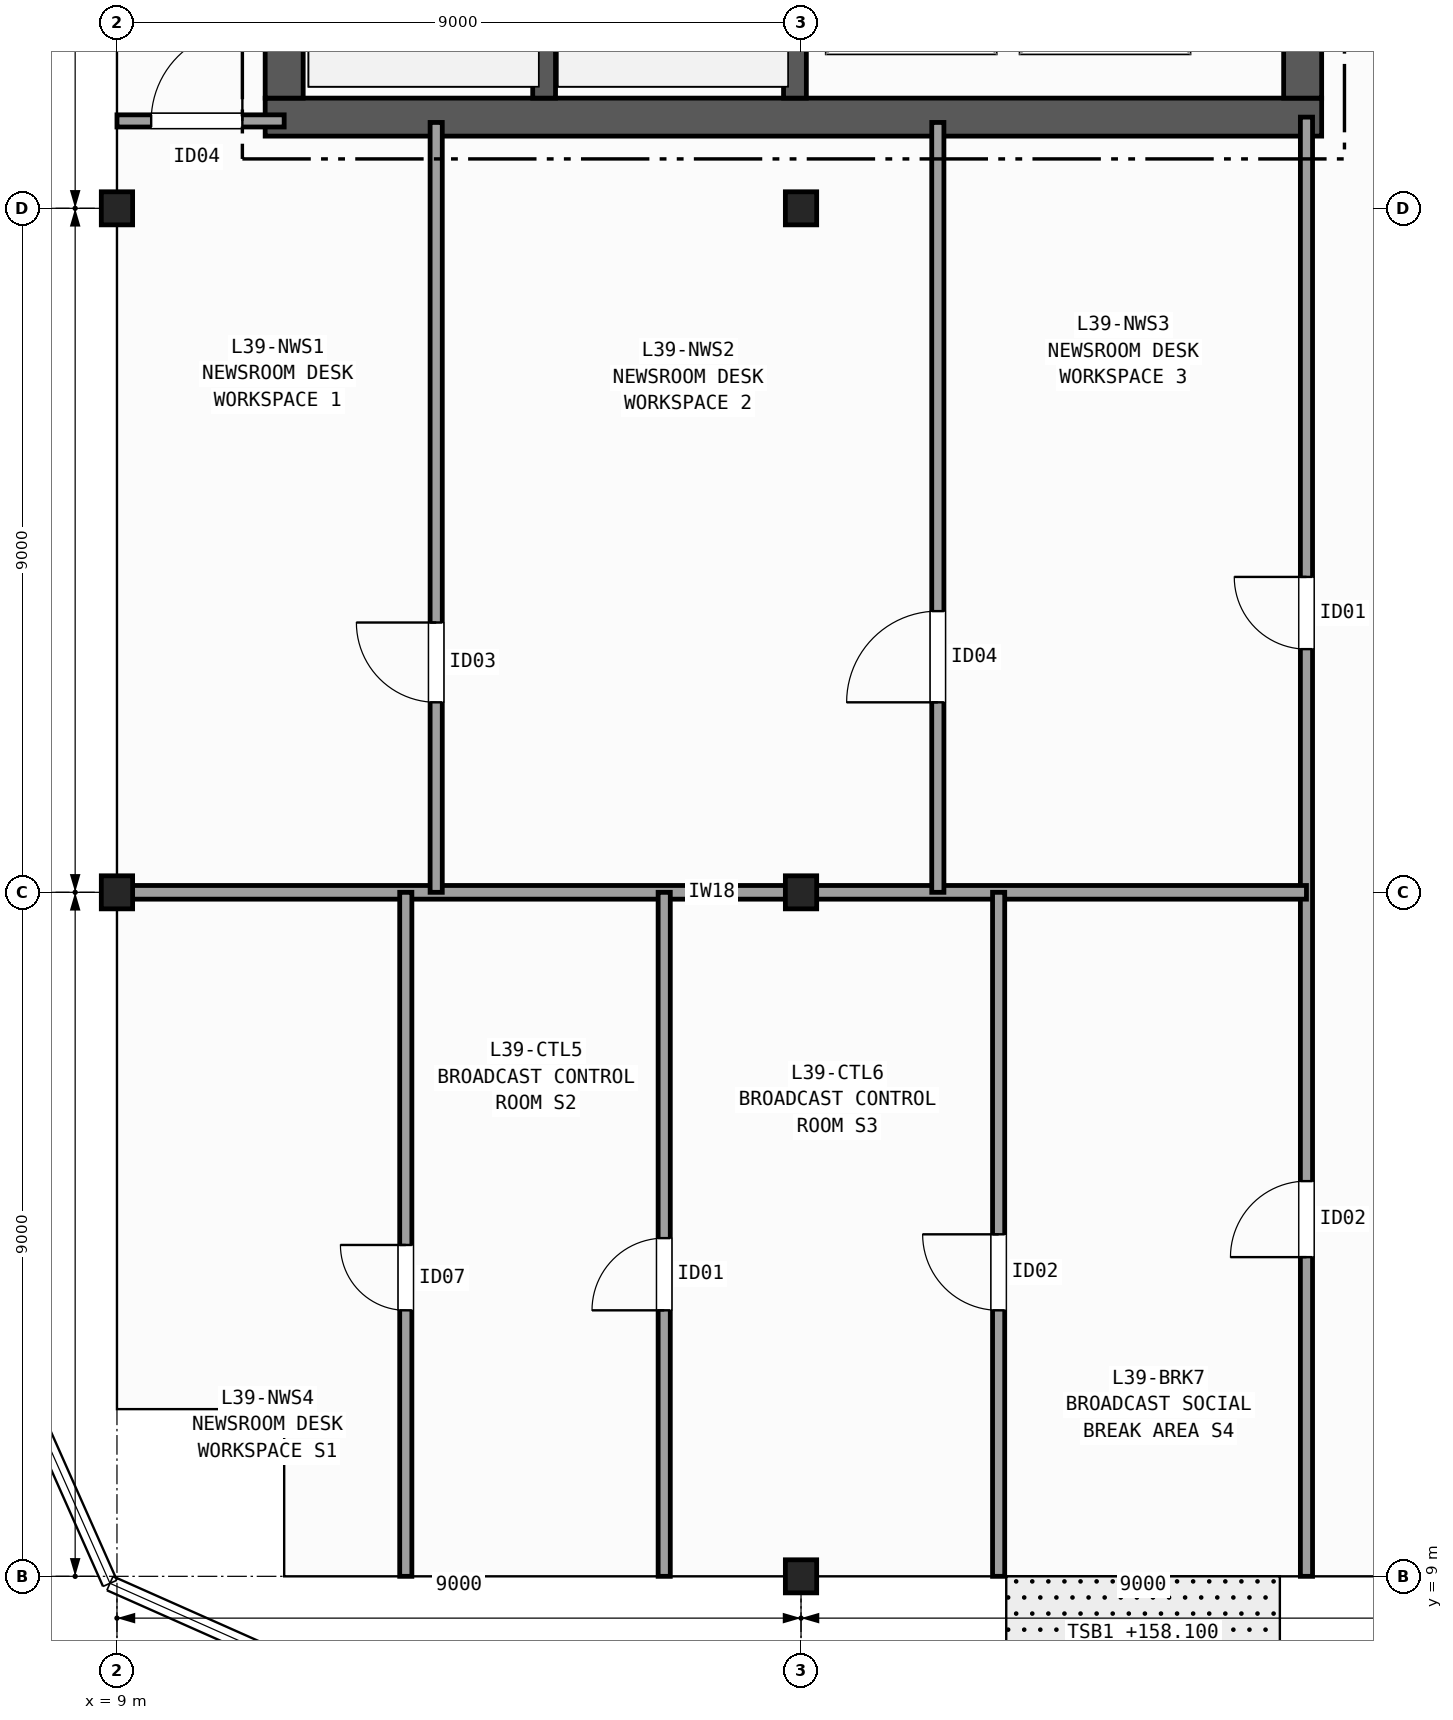
"""IFC4 building model, lengths in metres.
Left out: names, types, materials, properties, quantities, classifications, styles, units other than length and angle.
Written with IfcOpenShell. Run it as: python <this file> out.ifc"""

import sys

from ifc_helpers import new_model, si_unit, direction, frame, frame_2d, origin, origin_2d, place, context, subcontext, project, spatial, rectangle, i_section, extrude, element, fill, save


model = new_model("IFC4")
c1 = context("Model", 3, precision=1e-05, world=origin(), true_north=direction((0.0, 1.0)))
c2 = subcontext(c1, "Body", "Model", "MODEL_VIEW")
j1 = project(units=[si_unit("LENGTHUNIT", "METRE"), si_unit("PLANEANGLEUNIT", "RADIAN")], contexts=[c1])
p1 = place(None, origin())
s1 = spatial("IfcSite", under=j1, at=p1, CompositionType="ELEMENT")
p2 = place(p1, origin())
s2 = spatial("IfcBuilding", under=s1, at=p2, CompositionType="ELEMENT")
p3 = place(p2, frame((0.0, 0.0, 158.1)))
s3 = spatial("IfcBuildingStorey", under=s2, at=p3, CompositionType="ELEMENT", Elevation=158.1)
for number, where, z_axis, x_axis in (
    (1, (9.0, 18.0, 0.0), (0.0, 0.0, 1.0), (1.0, 0.0, 0.0)),
    (2, (9.0, 27.0, 0.0), (0.0, 0.0, 1.0), (1.0, 0.0, 0.0)),
    (3, (18.0, 9.0, 0.0), (0.0, 0.0, 1.0), (1.0, 0.0, 0.0)),
    (4, (18.0, 18.0, 0.0), (0.0, 0.0, 1.0), (1.0, 0.0, 0.0)),
    (5, (18.0, 27.0, 0.0), (0.0, 0.0, 1.0), (1.0, 0.0, 0.0)),
):
    element("IfcColumn", number, at=place(p3, frame(where, z_axis=z_axis, x_axis=x_axis)), inside=s3, PredefinedType="COLUMN", context=c2, shape_type="SweptSolid", body=[
        extrude(i_section(OverallWidth=0.412, OverallDepth=0.435, WebThickness=0.036, FlangeThickness=0.057, FilletRadius=0.015, at=origin_2d()), origin(), (0.0, 0.0, 1.0), 3.7),
    ])
p4 = place(p3, frame((10.95, 28.2, 0.0), z_axis=(0.0, 0.0, 1.0), x_axis=(1.0, 0.0, 0.0)))
e6 = element("IfcWall", 6, at=p4, inside=s3, PredefinedType="SHEAR", context=c2, shape_type="SweptSolid", body=[
    extrude(rectangle(XDim=13.9, YDim=0.5, at=frame_2d((6.95, 0.0))), origin(), (0.0, 0.0, 1.0), 3.42),
])
p5 = place(p3, frame((11.2, 42.15, 0.0), z_axis=(0.0, 0.0, 1.0), x_axis=(0.0, -1.0, 0.0)))
e7 = element("IfcWall", 7, at=p5, inside=s3, PredefinedType="SHEAR", context=c2, shape_type="SweptSolid", body=[
    extrude(rectangle(XDim=13.7, YDim=0.5, at=frame_2d((6.85, 0.0))), origin(), (0.0, 0.0, 1.0), 3.42),
])
p6 = place(p3, frame((24.6, 28.45, 0.0), z_axis=(0.0, 0.0, 1.0), x_axis=(0.0, 1.0, 0.0)))
e8 = element("IfcWall", 8, at=p6, inside=s3, PredefinedType="SHEAR", context=c2, shape_type="SweptSolid", body=[
    extrude(rectangle(XDim=13.7, YDim=0.5, at=frame_2d((6.85, 0.0))), origin(), (0.0, 0.0, 1.0), 3.42),
])
p7 = place(p6, frame((3.35, 0.0, 0.0)))
e9 = element("IfcOpeningElement", 9, at=p7, cuts=e8, PredefinedType="OPENING", context=c2, shape_type="SweptSolid", body=[
    extrude(rectangle(XDim=1.5, YDim=2.2, at=frame_2d((0.75, 1.1))), frame((0.0, 0.26, 0.0), z_axis=(0.0, -1.0, 0.0), x_axis=(1.0, 0.0, 0.0)), (0.0, 0.0, 1.0), 0.52),
])
p8 = place(p6, frame((9.95, 0.0, 0.0)))
e10 = element("IfcOpeningElement", 10, at=p8, cuts=e8, PredefinedType="OPENING", context=c2, shape_type="SweptSolid", body=[
    extrude(rectangle(XDim=0.9, YDim=2.1, at=frame_2d((0.45, 1.05))), frame((0.0, 0.26, 0.0), z_axis=(0.0, -1.0, 0.0), x_axis=(1.0, 0.0, 0.0)), (0.0, 0.0, 1.0), 0.52),
])
p9 = place(p6, frame((12.05, 0.0, 0.0)))
e11 = element("IfcOpeningElement", 11, at=p9, cuts=e8, PredefinedType="OPENING", context=c2, shape_type="SweptSolid", body=[
    extrude(rectangle(XDim=0.9, YDim=2.1, at=frame_2d((0.45, 1.05))), frame((0.0, 0.26, 0.0), z_axis=(0.0, -1.0, 0.0), x_axis=(1.0, 0.0, 0.0)), (0.0, 0.0, 1.0), 0.52),
])
p10 = place(p3, frame((14.62, 28.45, 0.0), z_axis=(0.0, 0.0, 1.0), x_axis=(0.0, 1.0, 0.0)))
e12 = element("IfcWall", 12, at=p10, inside=s3, PredefinedType="SHEAR", context=c2, shape_type="SweptSolid", body=[
    extrude(rectangle(XDim=9.0, YDim=0.3, at=frame_2d((4.5, 0.0))), origin(), (0.0, 0.0, 1.0), 3.42),
])
p11 = place(p3, frame((17.92, 42.15, 0.0), z_axis=(0.0, 0.0, 1.0), x_axis=(0.0, -1.0, 0.0)))
e13 = element("IfcWall", 13, at=p11, inside=s3, PredefinedType="SHEAR", context=c2, shape_type="SweptSolid", body=[
    extrude(rectangle(XDim=13.7, YDim=0.3, at=frame_2d((6.85, 0.0))), origin(), (0.0, 0.0, 1.0), 3.42),
])
p12 = place(p11, frame((1.975, 0.0, 0.0)))
e14 = element("IfcOpeningElement", 14, at=p12, cuts=e13, PredefinedType="OPENING", context=c2, shape_type="SweptSolid", body=[
    extrude(rectangle(XDim=1.15, YDim=2.15, at=frame_2d((0.575, 1.075))), frame((0.0, 0.16, 0.0), z_axis=(0.0, -1.0, 0.0), x_axis=(1.0, 0.0, 0.0)), (0.0, 0.0, 1.0), 0.32),
])
p13 = place(p3, frame((9.0, 28.15, 0.0), z_axis=(0.0, 0.0, 1.0), x_axis=(1.0, 0.0, 0.0)))
e15 = element("IfcWall", 15, at=p13, inside=s3, PredefinedType="PARTITIONING", context=c2, shape_type="SweptSolid", body=[
    extrude(rectangle(XDim=2.2, YDim=0.16, at=frame_2d((1.1, 0.0))), origin(), (0.0, 0.0, 1.0), 2.634),
])
p14 = place(p13, frame((0.45, 0.0, 0.0)))
e16 = element("IfcOpeningElement", 16, at=p14, cuts=e15, PredefinedType="OPENING", context=c2, shape_type="SweptSolid", body=[
    extrude(rectangle(XDim=1.2, YDim=2.15, at=frame_2d((0.6, 1.075))), frame((0.0, 0.09, 0.0), z_axis=(0.0, -1.0, 0.0), x_axis=(1.0, 0.0, 0.0)), (0.0, 0.0, 1.0), 0.18),
])
p15 = place(p3, frame((24.65, 9.0, 0.0), z_axis=(0.0, 0.0, 1.0), x_axis=(0.0, 1.0, 0.0)))
e17 = element("IfcWall", 17, at=p15, inside=s3, PredefinedType="PARTITIONING", context=c2, shape_type="SweptSolid", body=[
    extrude(rectangle(XDim=19.2, YDim=0.16, at=frame_2d((9.6, 0.0))), origin(), (0.0, 0.0, 1.0), 2.634),
])
p16 = place(p15, frame((12.2, 0.0, 0.0)))
e18 = element("IfcOpeningElement", 18, at=p16, cuts=e17, PredefinedType="OPENING", context=c2, shape_type="SweptSolid", body=[
    extrude(rectangle(XDim=0.95, YDim=2.1, at=frame_2d((0.475, 1.05))), frame((0.0, 0.09, 0.0), z_axis=(0.0, -1.0, 0.0), x_axis=(1.0, 0.0, 0.0)), (0.0, 0.0, 1.0), 0.18),
])
p17 = place(p15, frame((4.2, 0.0, 0.0)))
e19 = element("IfcOpeningElement", 19, at=p17, cuts=e17, PredefinedType="OPENING", context=c2, shape_type="SweptSolid", body=[
    extrude(rectangle(XDim=1.0, YDim=2.1, at=frame_2d((0.5, 1.05))), frame((0.0, 0.09, 0.0), z_axis=(0.0, -1.0, 0.0), x_axis=(1.0, 0.0, 0.0)), (0.0, 0.0, 1.0), 0.18),
])
p18 = place(p3, frame((9.0, 18.0, 0.0), z_axis=(0.0, 0.0, 1.0), x_axis=(1.0, 0.0, 0.0)))
e20 = element("IfcWall", 20, at=p18, inside=s3, PredefinedType="PARTITIONING", context=c2, shape_type="SweptSolid", body=[
    extrude(rectangle(XDim=15.65, YDim=0.18, at=frame_2d((7.825, 0.0))), origin(), (0.0, 0.0, 1.0), 2.634),
])
p19 = place(p3, frame((13.2, 18.0, 0.0), z_axis=(0.0, 0.0, 1.0), x_axis=(0.0, 1.0, 0.0)))
e21 = element("IfcWall", 21, at=p19, inside=s3, PredefinedType="PARTITIONING", context=c2, shape_type="SweptSolid", body=[
    extrude(rectangle(XDim=10.13, YDim=0.16, at=frame_2d((5.065, 0.0))), origin(), (0.0, 0.0, 1.0), 2.789),
])
p20 = place(p19, frame((2.5, 0.0, 0.0)))
e22 = element("IfcOpeningElement", 22, at=p20, cuts=e21, PredefinedType="OPENING", context=c2, shape_type="SweptSolid", body=[
    extrude(rectangle(XDim=1.05, YDim=2.15, at=frame_2d((0.525, 1.075))), frame((0.0, 0.09, 0.0), z_axis=(0.0, -1.0, 0.0), x_axis=(1.0, 0.0, 0.0)), (0.0, 0.0, 1.0), 0.18),
])
p21 = place(p3, frame((19.8, 18.0, 0.0), z_axis=(0.0, 0.0, 1.0), x_axis=(0.0, 1.0, 0.0)))
e23 = element("IfcWall", 23, at=p21, inside=s3, PredefinedType="PARTITIONING", context=c2, shape_type="SweptSolid", body=[
    extrude(rectangle(XDim=10.13, YDim=0.16, at=frame_2d((5.065, 0.0))), origin(), (0.0, 0.0, 1.0), 2.789),
])
p22 = place(p21, frame((2.5, 0.0, 0.0)))
e24 = element("IfcOpeningElement", 24, at=p22, cuts=e23, PredefinedType="OPENING", context=c2, shape_type="SweptSolid", body=[
    extrude(rectangle(XDim=1.2, YDim=2.15, at=frame_2d((0.6, 1.075))), frame((0.0, 0.09, 0.0), z_axis=(0.0, -1.0, 0.0), x_axis=(1.0, 0.0, 0.0)), (0.0, 0.0, 1.0), 0.18),
])
p23 = place(p3, frame((12.8, 9.0, 0.0), z_axis=(0.0, 0.0, 1.0), x_axis=(0.0, 1.0, 0.0)))
e25 = element("IfcWall", 25, at=p23, inside=s3, PredefinedType="PARTITIONING", context=c2, shape_type="SweptSolid", body=[
    extrude(rectangle(XDim=9.0, YDim=0.16, at=frame_2d((4.5, 0.0))), origin(), (0.0, 0.0, 1.0), 2.789),
])
p24 = place(p23, frame((3.5, 0.0, 0.0)))
e26 = element("IfcOpeningElement", 26, at=p24, cuts=e25, PredefinedType="OPENING", context=c2, shape_type="SweptSolid", body=[
    extrude(rectangle(XDim=0.86, YDim=2.05, at=frame_2d((0.43, 1.025))), frame((0.0, 0.09, 0.0), z_axis=(0.0, -1.0, 0.0), x_axis=(1.0, 0.0, 0.0)), (0.0, 0.0, 1.0), 0.18),
])
p25 = place(p3, frame((16.2, 9.0, 0.0), z_axis=(0.0, 0.0, 1.0), x_axis=(0.0, 1.0, 0.0)))
e27 = element("IfcWall", 27, at=p25, inside=s3, PredefinedType="PARTITIONING", context=c2, shape_type="SweptSolid", body=[
    extrude(rectangle(XDim=9.0, YDim=0.16, at=frame_2d((4.5, 0.0))), origin(), (0.0, 0.0, 1.0), 2.789),
])
p26 = place(p25, frame((3.5, 0.0, 0.0)))
e28 = element("IfcOpeningElement", 28, at=p26, cuts=e27, PredefinedType="OPENING", context=c2, shape_type="SweptSolid", body=[
    extrude(rectangle(XDim=0.95, YDim=2.1, at=frame_2d((0.475, 1.05))), frame((0.0, 0.09, 0.0), z_axis=(0.0, -1.0, 0.0), x_axis=(1.0, 0.0, 0.0)), (0.0, 0.0, 1.0), 0.18),
])
p27 = place(p3, frame((20.6, 9.0, 0.0), z_axis=(0.0, 0.0, 1.0), x_axis=(0.0, 1.0, 0.0)))
e29 = element("IfcWall", 29, at=p27, inside=s3, PredefinedType="PARTITIONING", context=c2, shape_type="SweptSolid", body=[
    extrude(rectangle(XDim=9.0, YDim=0.16, at=frame_2d((4.5, 0.0))), origin(), (0.0, 0.0, 1.0), 2.634),
])
p28 = place(p27, frame((3.5, 0.0, 0.0)))
e30 = element("IfcOpeningElement", 30, at=p28, cuts=e29, PredefinedType="OPENING", context=c2, shape_type="SweptSolid", body=[
    extrude(rectangle(XDim=1.0, YDim=2.1, at=frame_2d((0.5, 1.05))), frame((0.0, 0.09, 0.0), z_axis=(0.0, -1.0, 0.0), x_axis=(1.0, 0.0, 0.0)), (0.0, 0.0, 1.0), 0.18),
])
p29 = place(p14, origin())
e31 = element("IfcDoor", 31, at=p29, inside=s3, OperationType="SINGLE_SWING_RIGHT", PredefinedType="DOOR", context=c2, shape_type="SweptSolid", body=[
    extrude(rectangle(XDim=1.2, YDim=2.15, at=frame_2d((0.6, 1.075))), frame((0.0, 0.025, 0.0), z_axis=(0.0, -1.0, 0.0), x_axis=(1.0, 0.0, 0.0)), (0.0, 0.0, 1.0), 0.05),
])
fill(e16, e31)
p30 = place(p16, origin())
e32 = element("IfcDoor", 32, at=p30, inside=s3, OperationType="SINGLE_SWING_RIGHT", PredefinedType="DOOR", context=c2, shape_type="SweptSolid", body=[
    extrude(rectangle(XDim=0.95, YDim=2.1, at=frame_2d((0.475, 1.05))), frame((0.0, 0.025, 0.0), z_axis=(0.0, -1.0, 0.0), x_axis=(1.0, 0.0, 0.0)), (0.0, 0.0, 1.0), 0.05),
])
fill(e18, e32)
p31 = place(p17, origin())
e33 = element("IfcDoor", 33, at=p31, inside=s3, OperationType="SINGLE_SWING_LEFT", PredefinedType="DOOR", context=c2, shape_type="SweptSolid", body=[
    extrude(rectangle(XDim=1.0, YDim=2.1, at=frame_2d((0.5, 1.05))), frame((0.0, 0.025, 0.0), z_axis=(0.0, -1.0, 0.0), x_axis=(1.0, 0.0, 0.0)), (0.0, 0.0, 1.0), 0.05),
])
fill(e19, e33)
p32 = place(p20, origin())
e34 = element("IfcDoor", 34, at=p32, inside=s3, OperationType="SINGLE_SWING_RIGHT", PredefinedType="DOOR", context=c2, shape_type="SweptSolid", body=[
    extrude(rectangle(XDim=1.05, YDim=2.15, at=frame_2d((0.525, 1.075))), frame((0.0, 0.025, 0.0), z_axis=(0.0, -1.0, 0.0), x_axis=(1.0, 0.0, 0.0)), (0.0, 0.0, 1.0), 0.05),
])
fill(e22, e34)
p33 = place(p22, origin())
e35 = element("IfcDoor", 35, at=p33, inside=s3, OperationType="SINGLE_SWING_LEFT", PredefinedType="DOOR", context=c2, shape_type="SweptSolid", body=[
    extrude(rectangle(XDim=1.2, YDim=2.15, at=frame_2d((0.6, 1.075))), frame((0.0, 0.025, 0.0), z_axis=(0.0, -1.0, 0.0), x_axis=(1.0, 0.0, 0.0)), (0.0, 0.0, 1.0), 0.05),
])
fill(e24, e35)
p34 = place(p24, origin())
e36 = element("IfcDoor", 36, at=p34, inside=s3, OperationType="SINGLE_SWING_RIGHT", PredefinedType="DOOR", context=c2, shape_type="SweptSolid", body=[
    extrude(rectangle(XDim=0.86, YDim=2.05, at=frame_2d((0.43, 1.025))), frame((0.0, 0.025, 0.0), z_axis=(0.0, -1.0, 0.0), x_axis=(1.0, 0.0, 0.0)), (0.0, 0.0, 1.0), 0.05),
])
fill(e26, e36)
p35 = place(p26, origin())
e37 = element("IfcDoor", 37, at=p35, inside=s3, OperationType="SINGLE_SWING_LEFT", PredefinedType="DOOR", context=c2, shape_type="SweptSolid", body=[
    extrude(rectangle(XDim=0.95, YDim=2.1, at=frame_2d((0.475, 1.05))), frame((0.0, 0.025, 0.0), z_axis=(0.0, -1.0, 0.0), x_axis=(1.0, 0.0, 0.0)), (0.0, 0.0, 1.0), 0.05),
])
fill(e28, e37)
p36 = place(p28, origin())
e38 = element("IfcDoor", 38, at=p36, inside=s3, OperationType="SINGLE_SWING_RIGHT", PredefinedType="DOOR", context=c2, shape_type="SweptSolid", body=[
    extrude(rectangle(XDim=1.0, YDim=2.1, at=frame_2d((0.5, 1.05))), frame((0.0, 0.025, 0.0), z_axis=(0.0, -1.0, 0.0), x_axis=(1.0, 0.0, 0.0)), (0.0, 0.0, 1.0), 0.05),
])
fill(e30, e38)
save(model, sys.argv[1])
